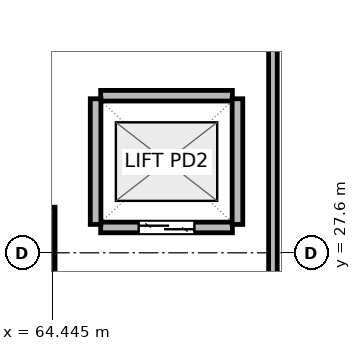
"""IFC4 building model, lengths in metres.
Left out: names, types, materials, properties, quantities, classifications, styles, units other than length and angle.
Written with IfcOpenShell. Run it as: python <this file> out.ifc"""

import sys

from ifc_helpers import new_model, si_unit, direction, frame, frame_2d, origin, origin_2d, place, context, subcontext, project, spatial, rectangle, extrude, element, fill, save


model = new_model("IFC4")
c1 = context("Model", 3, precision=1e-05, world=origin(), true_north=direction((0.0, 1.0)))
c2 = subcontext(c1, "Body", "Model", "MODEL_VIEW")
j1 = project(units=[si_unit("LENGTHUNIT", "METRE"), si_unit("PLANEANGLEUNIT", "RADIAN")], contexts=[c1])
p1 = place(None, origin())
s1 = spatial("IfcSite", under=j1, at=p1, CompositionType="ELEMENT")
p2 = place(p1, origin())
s2 = spatial("IfcBuilding", under=s1, at=p2, CompositionType="ELEMENT")
p3 = place(p2, frame((0.0, 0.0, 17.1)))
s3 = spatial("IfcBuildingStorey", under=s2, at=p3, CompositionType="ELEMENT", Elevation=17.1)
p4 = place(p3, frame((63.6, 27.6, 0.0), z_axis=(0.0, 0.0, 1.0), x_axis=(1.0, 0.0, 0.0)))
e1 = element("IfcColumn", 1, at=p4, inside=s3, PredefinedType="COLUMN", context=c2, shape_type="SweptSolid", body=[
    extrude(rectangle(XDim=1.8, YDim=1.8, at=origin_2d()), origin(), (0.0, 0.0, 1.0), 4.5),
])
p5 = place(p3, frame((65.4, 28.1, 0.0), z_axis=(0.0, 0.0, 1.0), x_axis=(1.0, 0.0, 0.0)))
e2 = element("IfcWall", 2, at=p5, inside=s3, PredefinedType="PARTITIONING", context=c2, shape_type="SweptSolid", body=[
    extrude(rectangle(XDim=2.6, YDim=0.21, at=frame_2d((1.3, 0.0))), origin(), (0.0, 0.0, 1.0), 2.775),
])
p6 = place(p5, frame((0.75, 0.0, 0.0)))
e3 = element("IfcOpeningElement", 3, at=p6, cuts=e2, PredefinedType="OPENING", context=c2, shape_type="SweptSolid", body=[
    extrude(rectangle(XDim=1.1, YDim=2.04, at=frame_2d((0.55, 1.02))), frame((0.0, 0.115, 0.0), z_axis=(0.0, -1.0, 0.0), x_axis=(1.0, 0.0, 0.0)), (0.0, 0.0, 1.0), 0.23),
])
p7 = place(p3, frame((65.4, 30.7, 0.0), z_axis=(0.0, 0.0, 1.0), x_axis=(1.0, 0.0, 0.0)))
e4 = element("IfcWall", 4, at=p7, inside=s3, PredefinedType="PARTITIONING", context=c2, shape_type="SweptSolid", body=[
    extrude(rectangle(XDim=2.6, YDim=0.21, at=frame_2d((1.3, 0.0))), origin(), (0.0, 0.0, 1.0), 4.24),
])
for number, where, z_axis, x_axis in (
    (5, (65.3, 28.16, 0.0), (0.0, 0.0, 1.0), (0.0, 1.0, 0.0)),
    (6, (68.1, 28.16, 0.0), (0.0, 0.0, 1.0), (0.0, 1.0, 0.0)),
):
    element("IfcWall", number, at=place(p3, frame(where, z_axis=z_axis, x_axis=x_axis)), inside=s3, PredefinedType="PARTITIONING", context=c2, shape_type="SweptSolid", body=[
        extrude(rectangle(XDim=2.48, YDim=0.21, at=frame_2d((1.24, 0.0))), origin(), (0.0, 0.0, 1.0), 4.24),
    ])
p8 = place(p3, frame((68.8, 25.187, 0.0), z_axis=(0.0, 0.0, 1.0), x_axis=(0.0, 1.0, 0.0)))
e7 = element("IfcWall", 7, at=p8, inside=s3, PredefinedType="PARTITIONING", context=c2, shape_type="SweptSolid", body=[
    extrude(rectangle(XDim=46.448, YDim=0.17, at=frame_2d((23.224, 0.0))), origin(), (0.0, 0.0, 1.0), 4.24),
])
p9 = place(p8, frame((15.913, 0.0, 0.0)))
e8 = element("IfcOpeningElement", 8, at=p9, cuts=e7, PredefinedType="OPENING", context=c2, shape_type="SweptSolid", body=[
    extrude(rectangle(XDim=1.1, YDim=2.05, at=frame_2d((0.55, 1.025))), frame((0.0, 0.095, 0.0), z_axis=(0.0, -1.0, 0.0), x_axis=(1.0, 0.0, 0.0)), (0.0, 0.0, 1.0), 0.19),
])
p10 = place(p6, origin())
e9 = element("IfcDoor", 9, at=p10, inside=s3, OperationType="DOUBLE_DOOR_SLIDING", PredefinedType="DOOR", context=c2, shape_type="SweptSolid", body=[
    extrude(rectangle(XDim=1.1, YDim=2.04, at=frame_2d((0.55, 1.02))), frame((0.0, 0.025, 0.0), z_axis=(0.0, -1.0, 0.0), x_axis=(1.0, 0.0, 0.0)), (0.0, 0.0, 1.0), 0.05),
])
fill(e3, e9)
save(model, sys.argv[1])
